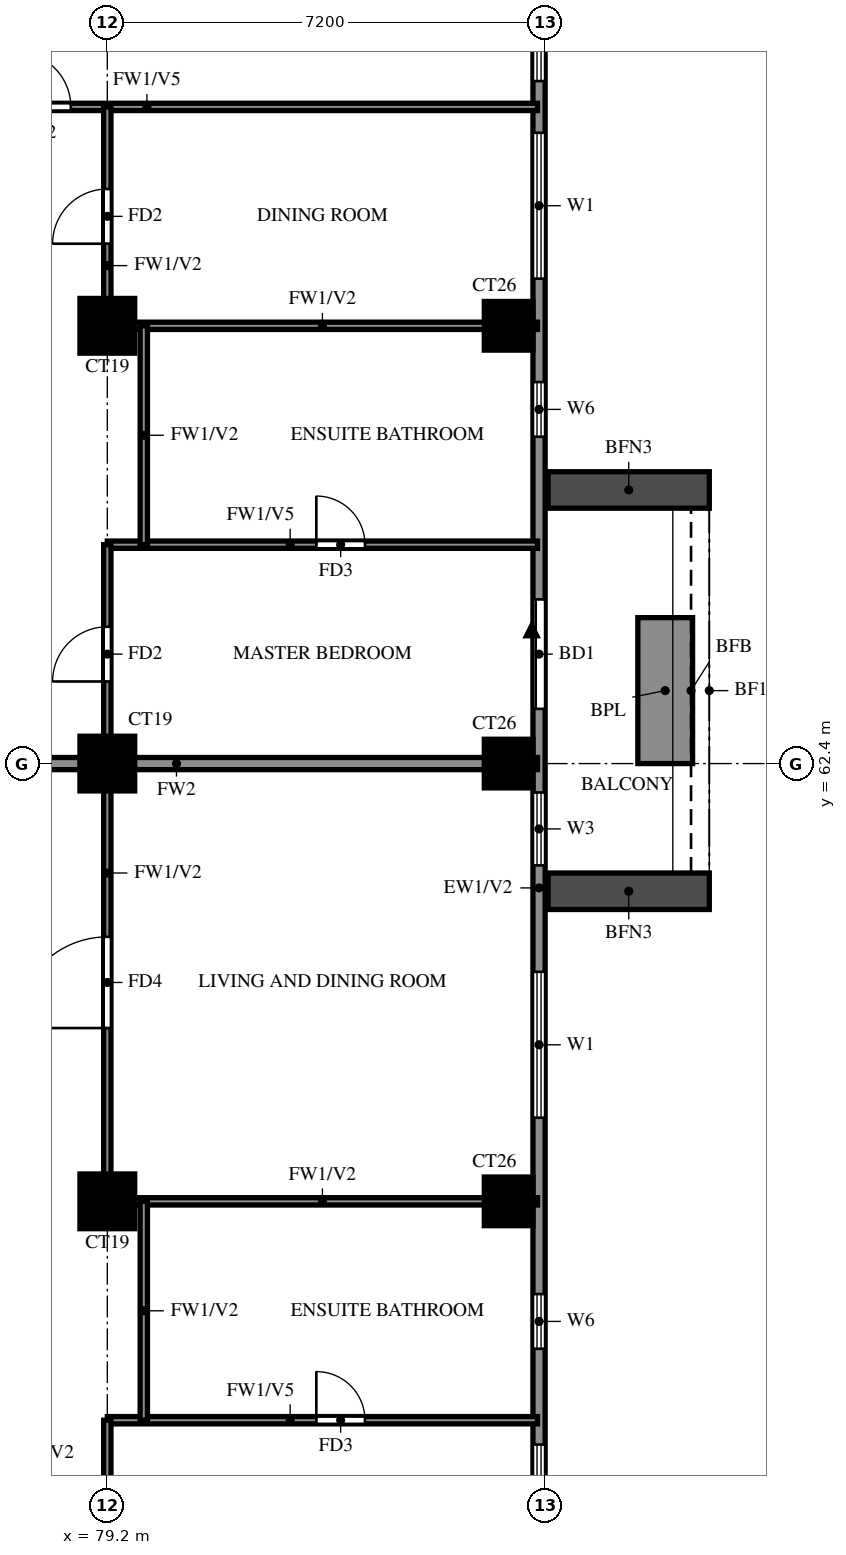
"""IFC4 building model, lengths in metres.
Left out: names, types, materials, properties, quantities, classifications, styles, units other than length and angle.
Written with IfcOpenShell. Run it as: python <this file> out.ifc"""

import sys

from ifc_helpers import new_model, si_unit, direction, frame, frame_2d, origin, origin_2d, place, context, subcontext, project, spatial, rectangle, extrude, source, transform, mapped, element, fill, save


model = new_model("IFC4")
c1 = context("Model", 3, precision=1e-05, world=origin(), true_north=direction((0.0, 1.0)))
c2 = subcontext(c1, "Body", "Model", "MODEL_VIEW")
j1 = project(units=[si_unit("LENGTHUNIT", "METRE"), si_unit("PLANEANGLEUNIT", "RADIAN")], contexts=[c1])
p1 = place(None, origin())
s1 = spatial("IfcSite", under=j1, at=p1, CompositionType="ELEMENT")
p2 = place(p1, origin())
s2 = spatial("IfcBuilding", under=s1, at=p2, CompositionType="ELEMENT")
p3 = place(p2, frame((0.0, 0.0, 195.5)))
s3 = spatial("IfcBuildingStorey", under=s2, at=p3, CompositionType="ELEMENT", Elevation=195.5)
m1 = source(origin(), c2, "Body", "SweptSolid", [
    extrude(rectangle(XDim=0.9, YDim=0.9, at=origin_2d()), origin(), (0.0, 0.0, 1.0), 3.2),
])
p4 = place(p3, frame((79.2, 55.2, 0.0), z_axis=(0.0, 0.0, 1.0), x_axis=(1.0, 0.0, 0.0)))
e1 = element("IfcColumn", 1, at=p4, inside=s3, PredefinedType="COLUMN", context=c2, shape_type="MappedRepresentation", body=[
    mapped(m1, transform((0.0, 0.0, 0.0))),
])
m2 = source(origin(), c2, "Body", "SweptSolid", [
    extrude(rectangle(XDim=0.8, YDim=0.8, at=origin_2d()), origin(), (0.0, 0.0, 1.0), 3.2),
])
p5 = place(p3, frame((85.8, 55.2, 0.0), z_axis=(0.0, 0.0, 1.0), x_axis=(1.0, 0.0, 0.0)))
e2 = element("IfcColumn", 2, at=p5, inside=s3, PredefinedType="COLUMN", context=c2, shape_type="MappedRepresentation", body=[
    mapped(m2, transform((0.0, 0.0, 0.0))),
])
p6 = place(p3, frame((79.2, 62.4, 0.0), z_axis=(0.0, 0.0, 1.0), x_axis=(1.0, 0.0, 0.0)))
e3 = element("IfcColumn", 3, at=p6, inside=s3, PredefinedType="COLUMN", context=c2, shape_type="MappedRepresentation", body=[
    mapped(m1, transform((0.0, 0.0, 0.0))),
])
p7 = place(p3, frame((85.8, 62.4, 0.0), z_axis=(0.0, 0.0, 1.0), x_axis=(1.0, 0.0, 0.0)))
e4 = element("IfcColumn", 4, at=p7, inside=s3, PredefinedType="COLUMN", context=c2, shape_type="MappedRepresentation", body=[
    mapped(m2, transform((0.0, 0.0, 0.0))),
])
p8 = place(p3, frame((79.2, 69.6, 0.0), z_axis=(0.0, 0.0, 1.0), x_axis=(1.0, 0.0, 0.0)))
e5 = element("IfcColumn", 5, at=p8, inside=s3, PredefinedType="COLUMN", context=c2, shape_type="MappedRepresentation", body=[
    mapped(m1, transform((0.0, 0.0, 0.0))),
])
p9 = place(p3, frame((85.8, 69.6, 0.0), z_axis=(0.0, 0.0, 1.0), x_axis=(1.0, 0.0, 0.0)))
e6 = element("IfcColumn", 6, at=p9, inside=s3, PredefinedType="COLUMN", context=c2, shape_type="MappedRepresentation", body=[
    mapped(m2, transform((0.0, 0.0, 0.0))),
])
p10 = place(p3, frame((86.3, 48.2, 0.0), z_axis=(0.0, 0.0, 1.0), x_axis=(0.0, 1.0, 0.0)))
e7 = element("IfcWall", 7, at=p10, inside=s3, PredefinedType="SOLIDWALL", context=c2, shape_type="SweptSolid", body=[
    extrude(rectangle(XDim=28.6, YDim=0.2, at=frame_2d((14.3, 0.0))), origin(), (0.0, 0.0, 1.0), 3.2),
])
p11 = place(p10, frame((15.1, 0.0, 0.0)))
e8 = element("IfcOpeningElement", 8, at=p11, cuts=e7, PredefinedType="OPENING", context=c2, shape_type="SweptSolid", body=[
    extrude(rectangle(XDim=1.8, YDim=2.4, at=frame_2d((0.9, 1.2))), frame((0.0, 0.11, 0.0), z_axis=(0.0, -1.0, 0.0), x_axis=(1.0, 0.0, 0.0)), (0.0, 0.0, 1.0), 0.22),
])
p12 = place(p10, frame((0.6, 0.0, 0.6)))
e9 = element("IfcOpeningElement", 9, at=p12, cuts=e7, PredefinedType="OPENING", context=c2, shape_type="SweptSolid", body=[
    extrude(rectangle(XDim=2.4, YDim=2.4, at=frame_2d((1.2, 1.2))), frame((0.0, 0.11, 0.0), z_axis=(0.0, -1.0, 0.0), x_axis=(1.0, 0.0, 0.0)), (0.0, 0.0, 1.0), 0.22),
])
p13 = place(p10, frame((4.575, 0.0, 1.5)))
e10 = element("IfcOpeningElement", 10, at=p13, cuts=e7, PredefinedType="OPENING", context=c2, shape_type="SweptSolid", body=[
    extrude(rectangle(XDim=0.9, YDim=0.9, at=frame_2d((0.45, 0.45))), frame((0.0, 0.11, 0.0), z_axis=(0.0, -1.0, 0.0), x_axis=(1.0, 0.0, 0.0)), (0.0, 0.0, 1.0), 0.22),
])
p14 = place(p10, frame((8.375, 0.0, 0.6)))
e11 = element("IfcOpeningElement", 11, at=p14, cuts=e7, PredefinedType="OPENING", context=c2, shape_type="SweptSolid", body=[
    extrude(rectangle(XDim=2.4, YDim=2.4, at=frame_2d((1.2, 1.2))), frame((0.0, 0.11, 0.0), z_axis=(0.0, -1.0, 0.0), x_axis=(1.0, 0.0, 0.0)), (0.0, 0.0, 1.0), 0.22),
])
p15 = place(p10, frame((12.525, 0.0, 0.6)))
e12 = element("IfcOpeningElement", 12, at=p15, cuts=e7, PredefinedType="OPENING", context=c2, shape_type="SweptSolid", body=[
    extrude(rectangle(XDim=1.2, YDim=2.4, at=frame_2d((0.6, 1.2))), frame((0.0, 0.11, 0.0), z_axis=(0.0, -1.0, 0.0), x_axis=(1.0, 0.0, 0.0)), (0.0, 0.0, 1.0), 0.22),
])
p16 = place(p10, frame((19.575, 0.0, 1.5)))
e13 = element("IfcOpeningElement", 13, at=p16, cuts=e7, PredefinedType="OPENING", context=c2, shape_type="SweptSolid", body=[
    extrude(rectangle(XDim=0.9, YDim=0.9, at=frame_2d((0.45, 0.45))), frame((0.0, 0.11, 0.0), z_axis=(0.0, -1.0, 0.0), x_axis=(1.0, 0.0, 0.0)), (0.0, 0.0, 1.0), 0.22),
])
p17 = place(p10, frame((22.175, 0.0, 0.6)))
e14 = element("IfcOpeningElement", 14, at=p17, cuts=e7, PredefinedType="OPENING", context=c2, shape_type="SweptSolid", body=[
    extrude(rectangle(XDim=2.4, YDim=2.4, at=frame_2d((1.2, 1.2))), frame((0.0, 0.11, 0.0), z_axis=(0.0, -1.0, 0.0), x_axis=(1.0, 0.0, 0.0)), (0.0, 0.0, 1.0), 0.22),
])
p18 = place(p10, frame((25.425, 0.0, 0.6)))
e15 = element("IfcOpeningElement", 15, at=p18, cuts=e7, PredefinedType="OPENING", context=c2, shape_type="SweptSolid", body=[
    extrude(rectangle(XDim=2.4, YDim=2.4, at=frame_2d((1.2, 1.2))), frame((0.0, 0.11, 0.0), z_axis=(0.0, -1.0, 0.0), x_axis=(1.0, 0.0, 0.0)), (0.0, 0.0, 1.0), 0.22),
])
for number, where, z_axis, x_axis in (
    (16, (86.45, 60.3, 0.0), (0.0, 0.0, 1.0), (1.0, 0.0, 0.0)),
    (17, (86.45, 66.9, 0.0), (0.0, 0.0, 1.0), (1.0, 0.0, 0.0)),
):
    element("IfcWall", number, at=place(p3, frame(where, z_axis=z_axis, x_axis=x_axis)), inside=s3, PredefinedType="SOLIDWALL", context=c2, shape_type="SweptSolid", body=[
        extrude(rectangle(XDim=2.65, YDim=0.6, at=frame_2d((1.325, 0.0))), origin(), (0.0, 0.0, 1.0), 2.85),
    ])
p19 = place(p3, frame((88.375, 62.4, 0.0), z_axis=(0.0, 0.0, 1.0), x_axis=(0.0, 1.0, 0.0)))
e18 = element("IfcWall", 18, at=p19, inside=s3, PredefinedType="SOLIDWALL", context=c2, shape_type="SweptSolid", body=[
    extrude(rectangle(XDim=2.4, YDim=0.9, at=frame_2d((1.2, 0.0))), origin(), (0.0, 0.0, 1.0), 0.9),
])
p20 = place(p3, frame((74.4, 62.4, 0.0), z_axis=(0.0, 0.0, 1.0), x_axis=(1.0, 0.0, 0.0)))
e19 = element("IfcWall", 19, at=p20, inside=s3, PredefinedType="SOLIDWALL", context=c2, shape_type="SweptSolid", body=[
    extrude(rectangle(XDim=11.875, YDim=0.2, at=frame_2d((5.938, 0.0))), origin(), (0.0, 0.0, 1.0), 3.2),
])
p21 = place(p3, frame((79.2, 51.6, 0.0), z_axis=(0.0, 0.0, 1.0), x_axis=(1.0, 0.0, 0.0)))
e20 = element("IfcWall", 20, at=p21, inside=s3, PredefinedType="PARTITIONING", context=c2, shape_type="SweptSolid", body=[
    extrude(rectangle(XDim=7.075, YDim=0.12, at=frame_2d((3.538, 0.0))), origin(), (0.0, 0.0, 1.0), 2.3),
])
p22 = place(p21, frame((3.438, 0.0, 0.0)))
e21 = element("IfcOpeningElement", 21, at=p22, cuts=e20, PredefinedType="OPENING", context=c2, shape_type="SweptSolid", body=[
    extrude(rectangle(XDim=0.8, YDim=2.1, at=frame_2d((0.4, 1.05))), frame((0.0, 0.07, 0.0), z_axis=(0.0, -1.0, 0.0), x_axis=(1.0, 0.0, 0.0)), (0.0, 0.0, 1.0), 0.14),
])
p23 = place(p3, frame((79.2, 55.2, 0.0), z_axis=(0.0, 0.0, 1.0), x_axis=(1.0, 0.0, 0.0)))
e22 = element("IfcWall", 22, at=p23, inside=s3, PredefinedType="PARTITIONING", context=c2, shape_type="SweptSolid", body=[
    extrude(rectangle(XDim=7.075, YDim=0.12, at=frame_2d((3.538, 0.0))), origin(), (0.0, 0.0, 1.0), 3.2),
])
p24 = place(p3, frame((79.2, 66.0, 0.0), z_axis=(0.0, 0.0, 1.0), x_axis=(1.0, 0.0, 0.0)))
e23 = element("IfcWall", 23, at=p24, inside=s3, PredefinedType="PARTITIONING", context=c2, shape_type="SweptSolid", body=[
    extrude(rectangle(XDim=7.075, YDim=0.12, at=frame_2d((3.538, 0.0))), origin(), (0.0, 0.0, 1.0), 2.3),
])
p25 = place(p24, frame((3.438, 0.0, 0.0)))
e24 = element("IfcOpeningElement", 24, at=p25, cuts=e23, PredefinedType="OPENING", context=c2, shape_type="SweptSolid", body=[
    extrude(rectangle(XDim=0.8, YDim=2.1, at=frame_2d((0.4, 1.05))), frame((0.0, 0.07, 0.0), z_axis=(0.0, -1.0, 0.0), x_axis=(1.0, 0.0, 0.0)), (0.0, 0.0, 1.0), 0.14),
])
p26 = place(p3, frame((79.2, 69.6, 0.0), z_axis=(0.0, 0.0, 1.0), x_axis=(1.0, 0.0, 0.0)))
e25 = element("IfcWall", 25, at=p26, inside=s3, PredefinedType="PARTITIONING", context=c2, shape_type="SweptSolid", body=[
    extrude(rectangle(XDim=7.075, YDim=0.12, at=frame_2d((3.538, 0.0))), origin(), (0.0, 0.0, 1.0), 3.2),
])
p27 = place(p3, frame((72.0, 73.2, 0.0), z_axis=(0.0, 0.0, 1.0), x_axis=(1.0, 0.0, 0.0)))
e26 = element("IfcWall", 26, at=p27, inside=s3, PredefinedType="PARTITIONING", context=c2, shape_type="SweptSolid", body=[
    extrude(rectangle(XDim=14.275, YDim=0.12, at=frame_2d((7.137, 0.0))), origin(), (0.0, 0.0, 1.0), 2.3),
])
p28 = place(p27, frame((5.7, 0.0, 0.0)))
e27 = element("IfcOpeningElement", 27, at=p28, cuts=e26, PredefinedType="OPENING", context=c2, shape_type="SweptSolid", body=[
    extrude(rectangle(XDim=0.9, YDim=2.1, at=frame_2d((0.45, 1.05))), frame((0.0, 0.07, 0.0), z_axis=(0.0, -1.0, 0.0), x_axis=(1.0, 0.0, 0.0)), (0.0, 0.0, 1.0), 0.14),
])
p29 = place(p3, frame((79.2, 48.125, 0.0), z_axis=(0.0, 0.0, 1.0), x_axis=(0.0, 1.0, 0.0)))
e28 = element("IfcWall", 28, at=p29, inside=s3, PredefinedType="PARTITIONING", context=c2, shape_type="SweptSolid", body=[
    extrude(rectangle(XDim=3.475, YDim=0.12, at=frame_2d((1.738, 0.0))), origin(), (0.0, 0.0, 1.0), 3.2),
])
p30 = place(p29, frame((1.288, 0.0, 0.0)))
e29 = element("IfcOpeningElement", 29, at=p30, cuts=e28, PredefinedType="OPENING", context=c2, shape_type="SweptSolid", body=[
    extrude(rectangle(XDim=0.9, YDim=2.1, at=frame_2d((0.45, 1.05))), frame((0.0, 0.07, 0.0), z_axis=(0.0, -1.0, 0.0), x_axis=(1.0, 0.0, 0.0)), (0.0, 0.0, 1.0), 0.14),
])
p31 = place(p3, frame((79.2, 55.2, 0.0), z_axis=(0.0, 0.0, 1.0), x_axis=(0.0, 1.0, 0.0)))
e30 = element("IfcWall", 30, at=p31, inside=s3, PredefinedType="PARTITIONING", context=c2, shape_type="SweptSolid", body=[
    extrude(rectangle(XDim=10.8, YDim=0.12, at=frame_2d((5.4, 0.0))), origin(), (0.0, 0.0, 1.0), 3.2),
])
p32 = place(p31, frame((2.85, 0.0, 0.0)))
e31 = element("IfcOpeningElement", 31, at=p32, cuts=e30, PredefinedType="OPENING", context=c2, shape_type="SweptSolid", body=[
    extrude(rectangle(XDim=1.5, YDim=2.1, at=frame_2d((0.75, 1.05))), frame((0.0, 0.07, 0.0), z_axis=(0.0, -1.0, 0.0), x_axis=(1.0, 0.0, 0.0)), (0.0, 0.0, 1.0), 0.14),
])
p33 = place(p31, frame((8.55, 0.0, 0.0)))
e32 = element("IfcOpeningElement", 32, at=p33, cuts=e30, PredefinedType="OPENING", context=c2, shape_type="SweptSolid", body=[
    extrude(rectangle(XDim=0.9, YDim=2.1, at=frame_2d((0.45, 1.05))), frame((0.0, 0.07, 0.0), z_axis=(0.0, -1.0, 0.0), x_axis=(1.0, 0.0, 0.0)), (0.0, 0.0, 1.0), 0.14),
])
p34 = place(p3, frame((79.2, 69.6, 0.0), z_axis=(0.0, 0.0, 1.0), x_axis=(0.0, 1.0, 0.0)))
e33 = element("IfcWall", 33, at=p34, inside=s3, PredefinedType="PARTITIONING", context=c2, shape_type="SweptSolid", body=[
    extrude(rectangle(XDim=3.6, YDim=0.12, at=frame_2d((1.8, 0.0))), origin(), (0.0, 0.0, 1.0), 3.2),
])
p35 = place(p34, frame((1.35, 0.0, 0.0)))
e34 = element("IfcOpeningElement", 34, at=p35, cuts=e33, PredefinedType="OPENING", context=c2, shape_type="SweptSolid", body=[
    extrude(rectangle(XDim=0.9, YDim=2.1, at=frame_2d((0.45, 1.05))), frame((0.0, 0.07, 0.0), z_axis=(0.0, -1.0, 0.0), x_axis=(1.0, 0.0, 0.0)), (0.0, 0.0, 1.0), 0.14),
])
p36 = place(p3, frame((79.8, 51.6, 0.0), z_axis=(0.0, 0.0, 1.0), x_axis=(0.0, 1.0, 0.0)))
e35 = element("IfcWall", 35, at=p36, inside=s3, PredefinedType="PARTITIONING", context=c2, shape_type="SweptSolid", body=[
    extrude(rectangle(XDim=3.6, YDim=0.12, at=frame_2d((1.8, 0.0))), origin(), (0.0, 0.0, 1.0), 3.2),
])
p37 = place(p3, frame((79.8, 66.0, 0.0), z_axis=(0.0, 0.0, 1.0), x_axis=(0.0, 1.0, 0.0)))
e36 = element("IfcWall", 36, at=p37, inside=s3, PredefinedType="PARTITIONING", context=c2, shape_type="SweptSolid", body=[
    extrude(rectangle(XDim=3.6, YDim=0.12, at=frame_2d((1.8, 0.0))), origin(), (0.0, 0.0, 1.0), 3.2),
])
p38 = place(p11, origin())
e37 = element("IfcDoor", 37, at=p38, inside=s3, OperationType="DOUBLE_DOOR_SLIDING", PredefinedType="DOOR", context=c2, shape_type="SweptSolid", body=[
    extrude(rectangle(XDim=1.8, YDim=2.4, at=frame_2d((0.9, 1.2))), frame((0.0, 0.025, 0.0), z_axis=(0.0, -1.0, 0.0), x_axis=(1.0, 0.0, 0.0)), (0.0, 0.0, 1.0), 0.05),
])
fill(e8, e37)
p39 = place(p12, origin())
e38 = element("IfcWindow", 38, at=p39, inside=s3, PartitioningType="DOUBLE_PANEL_VERTICAL", PredefinedType="WINDOW", context=c2, shape_type="SweptSolid", body=[
    extrude(rectangle(XDim=2.4, YDim=2.4, at=frame_2d((1.2, 1.2))), frame((0.0, 0.03, 0.0), z_axis=(0.0, -1.0, 0.0), x_axis=(1.0, 0.0, 0.0)), (0.0, 0.0, 1.0), 0.06),
])
fill(e9, e38)
p40 = place(p13, origin())
e39 = element("IfcWindow", 39, at=p40, inside=s3, PartitioningType="SINGLE_PANEL", PredefinedType="WINDOW", context=c2, shape_type="SweptSolid", body=[
    extrude(rectangle(XDim=0.9, YDim=0.9, at=frame_2d((0.45, 0.45))), frame((0.0, 0.03, 0.0), z_axis=(0.0, -1.0, 0.0), x_axis=(1.0, 0.0, 0.0)), (0.0, 0.0, 1.0), 0.06),
])
fill(e10, e39)
p41 = place(p14, origin())
e40 = element("IfcWindow", 40, at=p41, inside=s3, PartitioningType="DOUBLE_PANEL_VERTICAL", PredefinedType="WINDOW", context=c2, shape_type="SweptSolid", body=[
    extrude(rectangle(XDim=2.4, YDim=2.4, at=frame_2d((1.2, 1.2))), frame((0.0, 0.03, 0.0), z_axis=(0.0, -1.0, 0.0), x_axis=(1.0, 0.0, 0.0)), (0.0, 0.0, 1.0), 0.06),
])
fill(e11, e40)
p42 = place(p15, origin())
e41 = element("IfcWindow", 41, at=p42, inside=s3, PartitioningType="SINGLE_PANEL", PredefinedType="WINDOW", context=c2, shape_type="SweptSolid", body=[
    extrude(rectangle(XDim=1.2, YDim=2.4, at=frame_2d((0.6, 1.2))), frame((0.0, 0.03, 0.0), z_axis=(0.0, -1.0, 0.0), x_axis=(1.0, 0.0, 0.0)), (0.0, 0.0, 1.0), 0.06),
])
fill(e12, e41)
p43 = place(p16, origin())
e42 = element("IfcWindow", 42, at=p43, inside=s3, PartitioningType="SINGLE_PANEL", PredefinedType="WINDOW", context=c2, shape_type="SweptSolid", body=[
    extrude(rectangle(XDim=0.9, YDim=0.9, at=frame_2d((0.45, 0.45))), frame((0.0, 0.03, 0.0), z_axis=(0.0, -1.0, 0.0), x_axis=(1.0, 0.0, 0.0)), (0.0, 0.0, 1.0), 0.06),
])
fill(e13, e42)
p44 = place(p17, origin())
e43 = element("IfcWindow", 43, at=p44, inside=s3, PartitioningType="DOUBLE_PANEL_VERTICAL", PredefinedType="WINDOW", context=c2, shape_type="SweptSolid", body=[
    extrude(rectangle(XDim=2.4, YDim=2.4, at=frame_2d((1.2, 1.2))), frame((0.0, 0.03, 0.0), z_axis=(0.0, -1.0, 0.0), x_axis=(1.0, 0.0, 0.0)), (0.0, 0.0, 1.0), 0.06),
])
fill(e14, e43)
p45 = place(p18, origin())
e44 = element("IfcWindow", 44, at=p45, inside=s3, PartitioningType="DOUBLE_PANEL_VERTICAL", PredefinedType="WINDOW", context=c2, shape_type="SweptSolid", body=[
    extrude(rectangle(XDim=2.4, YDim=2.4, at=frame_2d((1.2, 1.2))), frame((0.0, 0.03, 0.0), z_axis=(0.0, -1.0, 0.0), x_axis=(1.0, 0.0, 0.0)), (0.0, 0.0, 1.0), 0.06),
])
fill(e15, e44)
p46 = place(p22, origin())
e45 = element("IfcDoor", 45, at=p46, inside=s3, OperationType="SINGLE_SWING_RIGHT", PredefinedType="DOOR", context=c2, shape_type="SweptSolid", body=[
    extrude(rectangle(XDim=0.8, YDim=2.1, at=frame_2d((0.4, 1.05))), frame((0.0, 0.025, 0.0), z_axis=(0.0, -1.0, 0.0), x_axis=(1.0, 0.0, 0.0)), (0.0, 0.0, 1.0), 0.05),
])
fill(e21, e45)
p47 = place(p32, origin())
e46 = element("IfcDoor", 46, at=p47, inside=s3, OperationType="SINGLE_SWING_LEFT", PredefinedType="DOOR", context=c2, shape_type="SweptSolid", body=[
    extrude(rectangle(XDim=1.5, YDim=2.1, at=frame_2d((0.75, 1.05))), frame((0.0, 0.025, 0.0), z_axis=(0.0, -1.0, 0.0), x_axis=(1.0, 0.0, 0.0)), (0.0, 0.0, 1.0), 0.05),
])
fill(e31, e46)
p48 = place(p33, origin())
e47 = element("IfcDoor", 47, at=p48, inside=s3, OperationType="SINGLE_SWING_LEFT", PredefinedType="DOOR", context=c2, shape_type="SweptSolid", body=[
    extrude(rectangle(XDim=0.9, YDim=2.1, at=frame_2d((0.45, 1.05))), frame((0.0, 0.025, 0.0), z_axis=(0.0, -1.0, 0.0), x_axis=(1.0, 0.0, 0.0)), (0.0, 0.0, 1.0), 0.05),
])
fill(e32, e47)
p49 = place(p25, origin())
e48 = element("IfcDoor", 48, at=p49, inside=s3, OperationType="SINGLE_SWING_LEFT", PredefinedType="DOOR", context=c2, shape_type="SweptSolid", body=[
    extrude(rectangle(XDim=0.8, YDim=2.1, at=frame_2d((0.4, 1.05))), frame((0.0, 0.025, 0.0), z_axis=(0.0, -1.0, 0.0), x_axis=(1.0, 0.0, 0.0)), (0.0, 0.0, 1.0), 0.05),
])
fill(e24, e48)
p50 = place(p35, origin())
e49 = element("IfcDoor", 49, at=p50, inside=s3, OperationType="SINGLE_SWING_RIGHT", PredefinedType="DOOR", context=c2, shape_type="SweptSolid", body=[
    extrude(rectangle(XDim=0.9, YDim=2.1, at=frame_2d((0.45, 1.05))), frame((0.0, 0.025, 0.0), z_axis=(0.0, -1.0, 0.0), x_axis=(1.0, 0.0, 0.0)), (0.0, 0.0, 1.0), 0.05),
])
fill(e34, e49)
p51 = place(p28, origin())
e50 = element("IfcDoor", 50, at=p51, inside=s3, OperationType="SINGLE_SWING_LEFT", PredefinedType="DOOR", context=c2, shape_type="SweptSolid", body=[
    extrude(rectangle(XDim=0.9, YDim=2.1, at=frame_2d((0.45, 1.05))), frame((0.0, 0.025, 0.0), z_axis=(0.0, -1.0, 0.0), x_axis=(1.0, 0.0, 0.0)), (0.0, 0.0, 1.0), 0.05),
])
fill(e27, e50)
save(model, sys.argv[1])
